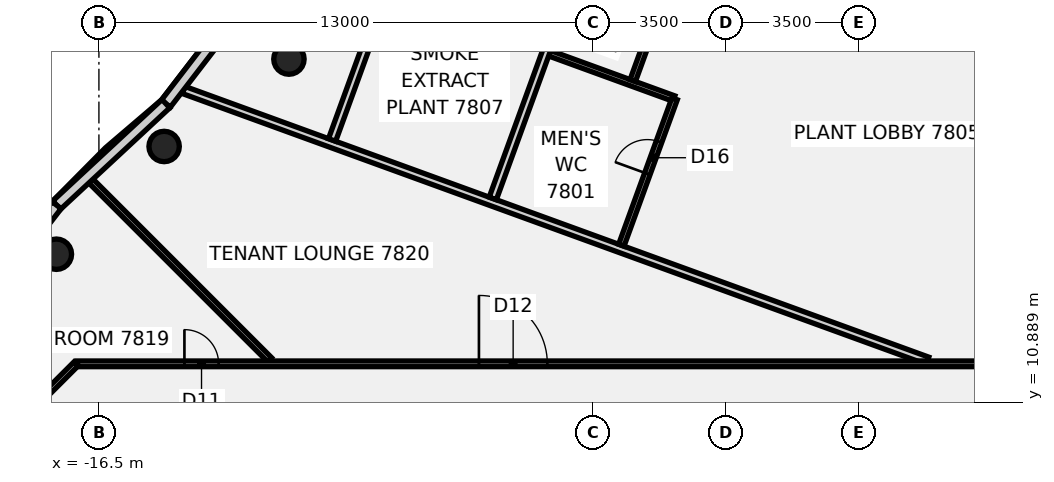
"""IFC4 building model, lengths in metres.
Left out: names, types, materials, properties, quantities, classifications, styles, units other than length and angle.
Written with IfcOpenShell. Run it as: python <this file> out.ifc"""

import sys

from ifc_helpers import new_model, si_unit, direction, frame, frame_2d, origin, origin_2d, place, context, subcontext, project, spatial, rectangle, circle, extrude, element, fill, save


model = new_model("IFC4")
c1 = context("Model", 3, precision=1e-05, world=origin(), true_north=direction((0.0, 1.0)))
c2 = subcontext(c1, "Body", "Model", "MODEL_VIEW")
j1 = project(units=[si_unit("LENGTHUNIT", "METRE"), si_unit("PLANEANGLEUNIT", "RADIAN")], contexts=[c1])
p1 = place(None, origin())
s1 = spatial("IfcSite", under=j1, at=p1, CompositionType="ELEMENT")
p2 = place(p1, origin())
s2 = spatial("IfcBuilding", under=s1, at=p2, CompositionType="ELEMENT")
p3 = place(p2, frame((0.0, 0.0, 317.4)))
s3 = spatial("IfcBuildingStorey", under=s2, at=p3, CompositionType="ELEMENT", Elevation=317.4)
for number, where, z_axis, x_axis in (
    (1, (-11.5, 19.919, -0.18), (0.0, 0.0, 1.0), (1.0, 0.0, 0.0)),
    (2, (-14.784, 17.619, -0.18), (0.0, 0.0, 1.0), (1.0, 0.0, 0.0)),
    (3, (-17.619, 14.784, -0.18), (0.0, 0.0, 1.0), (1.0, 0.0, 0.0)),
):
    element("IfcColumn", number, at=place(p3, frame(where, z_axis=z_axis, x_axis=x_axis)), inside=s3, PredefinedType="COLUMN", context=c2, shape_type="SweptSolid", body=[
        extrude(circle(Radius=0.4, at=origin_2d()), origin(), (0.0, 0.0, 1.0), 4.0),
    ])
p4 = place(p3, frame((-16.921, 16.921, 0.0), z_axis=(0.0, 0.0, 1.0), x_axis=(0.707106781187, -0.707106781187, 0.0)))
e4 = element("IfcWall", 4, at=p4, inside=s3, PredefinedType="PARTITIONING", context=c2, shape_type="SweptSolid", body=[
    extrude(rectangle(XDim=6.946, YDim=0.15, at=frame_2d((3.473, 0.0))), origin(), (0.0, 0.0, 1.0), 3.22),
])
p5 = place(p3, frame((-14.271, 19.106, 0.0), z_axis=(0.0, 0.0, 1.0), x_axis=(0.939707843555, -0.341978316216, 0.0)))
e5 = element("IfcWall", 5, at=p5, inside=s3, PredefinedType="PARTITIONING", context=c2, shape_type="SweptSolid", body=[
    extrude(rectangle(XDim=20.83, YDim=0.2, at=frame_2d((10.415, 0.0))), origin(), (0.0, 0.0, 1.0), 3.22),
])
p6 = place(p3, frame((-4.64, 20.071, 0.0), z_axis=(0.0, 0.0, 1.0), x_axis=(0.939625353143, -0.342204903138, 0.0)))
e6 = element("IfcWall", 6, at=p6, inside=s3, PredefinedType="PARTITIONING", context=c2, shape_type="SweptSolid", body=[
    extrude(rectangle(XDim=3.48, YDim=0.15, at=frame_2d((1.74, 0.0))), origin(), (0.0, 0.0, 1.0), 3.22),
])
p7 = place(p3, frame((-17.065, 11.9, 0.0), z_axis=(0.0, 0.0, 1.0), x_axis=(1.0, 0.0, 0.0)))
e7 = element("IfcWall", 7, at=p7, inside=s3, PredefinedType="PARTITIONING", context=c2, shape_type="SweptSolid", body=[
    extrude(rectangle(XDim=34.165, YDim=0.15, at=frame_2d((17.083, 0.0))), origin(), (0.0, 0.0, 1.0), 3.22),
])
p8 = place(p7, frame((24.544, 0.0, 0.0)))
e8 = element("IfcOpeningElement", 8, at=p8, cuts=e7, PredefinedType="OPENING", context=c2, shape_type="SweptSolid", body=[
    extrude(rectangle(XDim=1.8, YDim=2.1, at=frame_2d((0.9, 1.05))), frame((0.0, 0.085, 0.0), z_axis=(0.0, -1.0, 0.0), x_axis=(1.0, 0.0, 0.0)), (0.0, 0.0, 1.0), 0.17),
])
p9 = place(p7, frame((30.465, 0.0, 0.0)))
e9 = element("IfcOpeningElement", 9, at=p9, cuts=e7, PredefinedType="OPENING", context=c2, shape_type="SweptSolid", body=[
    extrude(rectangle(XDim=0.9, YDim=2.1, at=frame_2d((0.45, 1.05))), frame((0.0, 0.085, 0.0), z_axis=(0.0, -1.0, 0.0), x_axis=(1.0, 0.0, 0.0)), (0.0, 0.0, 1.0), 0.17),
])
p10 = place(p7, frame((2.815, 0.0, 0.0)))
e10 = element("IfcOpeningElement", 10, at=p10, cuts=e7, PredefinedType="OPENING", context=c2, shape_type="SweptSolid", body=[
    extrude(rectangle(XDim=0.9, YDim=2.1, at=frame_2d((0.45, 1.05))), frame((0.0, 0.085, 0.0), z_axis=(0.0, -1.0, 0.0), x_axis=(1.0, 0.0, 0.0)), (0.0, 0.0, 1.0), 0.17),
])
p11 = place(p7, frame((10.565, 0.0, 0.0)))
e11 = element("IfcOpeningElement", 11, at=p11, cuts=e7, PredefinedType="OPENING", context=c2, shape_type="SweptSolid", body=[
    extrude(rectangle(XDim=1.8, YDim=2.1, at=frame_2d((0.9, 1.05))), frame((0.0, 0.085, 0.0), z_axis=(0.0, -1.0, 0.0), x_axis=(1.0, 0.0, 0.0)), (0.0, 0.0, 1.0), 0.17),
])
p12 = place(p3, frame((-18.872, 10.128, 0.0), z_axis=(0.0, 0.0, 1.0), x_axis=(0.707106781187, 0.707106781187, 0.0)))
e12 = element("IfcWall", 12, at=p12, inside=s3, PredefinedType="PARTITIONING", context=c2, shape_type="SweptSolid", body=[
    extrude(rectangle(XDim=2.505, YDim=0.15, at=frame_2d((1.253, 0.0))), origin(), (0.0, 0.0, 1.0), 3.22),
])
p13 = place(p3, frame((-10.365, 17.791, 0.0), z_axis=(0.0, 0.0, 1.0), x_axis=(0.342032792834, 0.939688016645, 0.0)))
e13 = element("IfcWall", 13, at=p13, inside=s3, PredefinedType="PARTITIONING", context=c2, shape_type="SweptSolid", body=[
    extrude(rectangle(XDim=8.66, YDim=0.2, at=frame_2d((4.33, 0.0))), origin(), (0.0, 0.0, 1.0), 3.22),
])
p14 = place(p13, frame((6.6, 0.0, 0.0)))
e14 = element("IfcOpeningElement", 14, at=p14, cuts=e13, PredefinedType="OPENING", context=c2, shape_type="SweptSolid", body=[
    extrude(rectangle(XDim=1.4, YDim=2.1, at=frame_2d((0.7, 1.05))), frame((0.0, 0.11, 0.0), z_axis=(0.0, -1.0, 0.0), x_axis=(1.0, 0.0, 0.0)), (0.0, 0.0, 1.0), 0.22),
])
p15 = place(p3, frame((-6.136, 16.252, 0.0), z_axis=(0.0, 0.0, 1.0), x_axis=(0.341890434998, 0.939739820619, 0.0)))
e15 = element("IfcWall", 15, at=p15, inside=s3, PredefinedType="PARTITIONING", context=c2, shape_type="SweptSolid", body=[
    extrude(rectangle(XDim=6.518, YDim=0.2, at=frame_2d((3.259, 0.0))), origin(), (0.0, 0.0, 1.0), 3.22),
])
p16 = place(p3, frame((-2.753, 15.021, 0.0), z_axis=(0.0, 0.0, 1.0), x_axis=(0.341929559358, 0.939725585709, 0.0)))
e16 = element("IfcWall", 16, at=p16, inside=s3, PredefinedType="PARTITIONING", context=c2, shape_type="SweptSolid", body=[
    extrude(rectangle(XDim=4.099, YDim=0.15, at=frame_2d((2.05, 0.0))), origin(), (0.0, 0.0, 1.0), 3.22),
])
p17 = place(p16, frame((2.0, 0.0, 0.0)))
e17 = element("IfcOpeningElement", 17, at=p17, cuts=e16, PredefinedType="OPENING", context=c2, shape_type="SweptSolid", body=[
    extrude(rectangle(XDim=0.9, YDim=2.1, at=frame_2d((0.45, 1.05))), frame((0.0, 0.085, 0.0), z_axis=(0.0, -1.0, 0.0), x_axis=(1.0, 0.0, 0.0)), (0.0, 0.0, 1.0), 0.17),
])
p18 = place(p3, frame((-2.452, 19.354, 0.0), z_axis=(0.0, 0.0, 1.0), x_axis=(0.341765797908, 0.939785155969, 0.0)))
e18 = element("IfcWall", 18, at=p18, inside=s3, PredefinedType="PARTITIONING", context=c2, shape_type="SweptSolid", body=[
    extrude(rectangle(XDim=1.724, YDim=0.15, at=frame_2d((0.862, 0.0))), origin(), (0.0, 0.0, 1.0), 3.22),
])
p19 = place(p3, frame((-13.409, 20.474, 0.0), z_axis=(0.0, 0.0, 1.0), x_axis=(-0.609396950442, -0.792865282877, 0.0)))
e19 = element("IfcWall", 19, at=p19, inside=s3, PredefinedType="SOLIDWALL", context=c2, shape_type="SweptSolid", body=[
    extrude(rectangle(XDim=2.181, YDim=0.3, at=frame_2d((1.09, 0.0))), origin(), (0.0, 0.0, 1.0), 3.82),
])
p20 = place(p3, frame((-14.739, 18.745, 0.0), z_axis=(0.0, 0.0, 1.0), x_axis=(-0.73266715928, -0.680587124263, 0.0)))
e20 = element("IfcWall", 20, at=p20, inside=s3, PredefinedType="SOLIDWALL", context=c2, shape_type="SweptSolid", body=[
    extrude(rectangle(XDim=3.924, YDim=0.3, at=frame_2d((1.962, 0.0))), origin(), (0.0, 0.0, 1.0), 3.82),
])
p21 = place(p3, frame((-17.613, 16.075, 0.0), z_axis=(0.0, 0.0, 1.0), x_axis=(-0.610785688376, -0.79179596038, 0.0)))
e21 = element("IfcWall", 21, at=p21, inside=s3, PredefinedType="SOLIDWALL", context=c2, shape_type="SweptSolid", body=[
    extrude(rectangle(XDim=3.938, YDim=0.3, at=frame_2d((1.969, 0.0))), origin(), (0.0, 0.0, 1.0), 3.82),
])
p22 = place(p10, origin())
e22 = element("IfcDoor", 22, at=p22, inside=s3, OperationType="SINGLE_SWING_RIGHT", PredefinedType="DOOR", context=c2, shape_type="SweptSolid", body=[
    extrude(rectangle(XDim=0.9, YDim=2.1, at=frame_2d((0.45, 1.05))), frame((0.0, 0.025, 0.0), z_axis=(0.0, -1.0, 0.0), x_axis=(1.0, 0.0, 0.0)), (0.0, 0.0, 1.0), 0.05),
])
fill(e10, e22)
p23 = place(p11, origin())
e23 = element("IfcDoor", 23, at=p23, inside=s3, OperationType="DOUBLE_DOOR_SINGLE_SWING", PredefinedType="DOOR", context=c2, shape_type="SweptSolid", body=[
    extrude(rectangle(XDim=1.8, YDim=2.1, at=frame_2d((0.9, 1.05))), frame((0.0, 0.025, 0.0), z_axis=(0.0, -1.0, 0.0), x_axis=(1.0, 0.0, 0.0)), (0.0, 0.0, 1.0), 0.05),
])
fill(e11, e23)
p24 = place(p17, origin())
e24 = element("IfcDoor", 24, at=p24, inside=s3, OperationType="SINGLE_SWING_LEFT", PredefinedType="DOOR", context=c2, shape_type="SweptSolid", body=[
    extrude(rectangle(XDim=0.9, YDim=2.1, at=frame_2d((0.45, 1.05))), frame((0.0, 0.025, 0.0), z_axis=(0.0, -1.0, 0.0), x_axis=(1.0, 0.0, 0.0)), (0.0, 0.0, 1.0), 0.05),
])
fill(e17, e24)
save(model, sys.argv[1])
